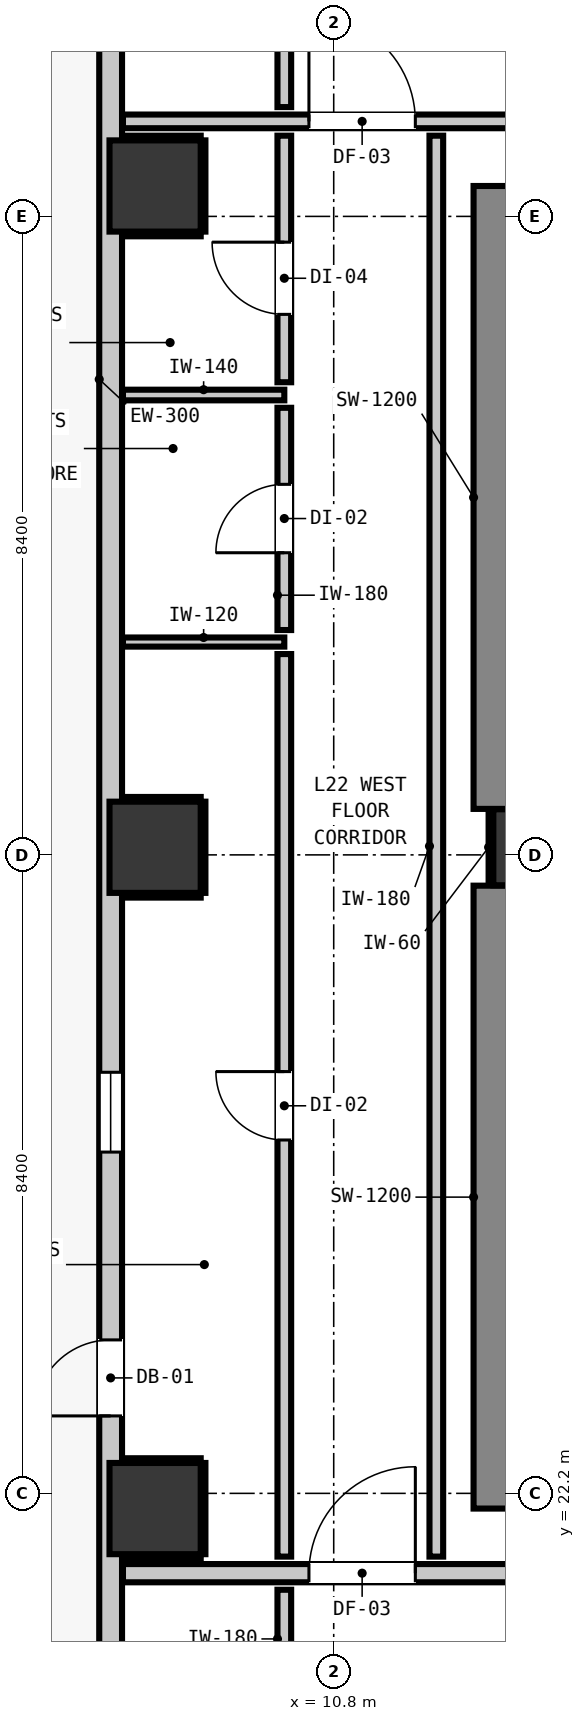
"""IFC4 building model, lengths in metres.
Left out: names, types, materials, properties, quantities, classifications, styles, units other than length and angle.
Written with IfcOpenShell. Run it as: python <this file> out.ifc"""

import sys

from ifc_helpers import new_model, si_unit, direction, frame, frame_2d, origin, origin_2d, place, context, subcontext, project, spatial, rectangle, extrude, element, fill, save


model = new_model("IFC4")
c1 = context("Model", 3, precision=1e-05, world=origin(), true_north=direction((0.0, 1.0)))
c2 = subcontext(c1, "Body", "Model", "MODEL_VIEW")
j1 = project(units=[si_unit("LENGTHUNIT", "METRE"), si_unit("PLANEANGLEUNIT", "RADIAN")], contexts=[c1])
p1 = place(None, origin())
s1 = spatial("IfcSite", under=j1, at=p1, CompositionType="ELEMENT")
p2 = place(p1, origin())
s2 = spatial("IfcBuilding", under=s1, at=p2, CompositionType="ELEMENT")
p3 = place(p2, frame((0.0, 0.0, 78.44)))
s3 = spatial("IfcBuildingStorey", under=s2, at=p3, CompositionType="ELEMENT", Elevation=78.44)
p4 = place(p3, frame((13.4, 30.7, 0.0), z_axis=(0.0, 0.0, 1.0), x_axis=(1.0, 0.0, 0.0)))
e1 = element("IfcColumn", 1, at=p4, inside=s3, PredefinedType="COLUMN", context=c2, shape_type="SweptSolid", body=[
    extrude(rectangle(XDim=1.0, YDim=1.0, at=origin_2d()), origin(), (0.0, 0.0, 1.0), 3.32),
])
p5 = place(p3, frame((13.24, 22.0, 0.0), z_axis=(0.0, 0.0, 1.0), x_axis=(0.0, 1.0, 0.0)))
e2 = element("IfcWall", 2, at=p5, inside=s3, PredefinedType="SHEAR", context=c2, shape_type="SweptSolid", body=[
    extrude(rectangle(XDim=8.195, YDim=1.2, at=frame_2d((4.098, 0.0))), origin(), (0.0, 0.0, 1.0), 3.32),
])
p6 = place(p3, frame((13.24, 31.205, 0.0), z_axis=(0.0, 0.0, 1.0), x_axis=(0.0, 1.0, 0.0)))
e3 = element("IfcWall", 3, at=p6, inside=s3, PredefinedType="SHEAR", context=c2, shape_type="SweptSolid", body=[
    extrude(rectangle(XDim=8.195, YDim=1.2, at=frame_2d((4.097, 0.0))), origin(), (0.0, 0.0, 1.0), 3.32),
])
for number, where, z_axis, x_axis in (
    (4, (8.45, 22.0, 0.0), (0.0, 0.0, 1.0), (1.0, 0.0, 0.0)),
    (5, (8.45, 30.7, 0.0), (0.0, 0.0, 1.0), (1.0, 0.0, 0.0)),
    (6, (8.45, 39.4, 0.0), (0.0, 0.0, 1.0), (1.0, 0.0, 0.0)),
):
    element("IfcColumn", number, at=place(p3, frame(where, z_axis=z_axis, x_axis=x_axis)), inside=s3, PredefinedType="COLUMN", context=c2, shape_type="SweptSolid", body=[
        extrude(rectangle(XDim=1.2, YDim=1.2, at=origin_2d()), origin(), (0.0, 0.0, 1.0), 2.9),
    ])
p7 = place(p3, frame((7.865, 16.365, 0.0), z_axis=(0.0, 0.0, 1.0), x_axis=(0.0, 1.0, 0.0)))
e7 = element("IfcWall", 7, at=p7, inside=s3, PredefinedType="STANDARD", context=c2, shape_type="SweptSolid", body=[
    extrude(rectangle(XDim=34.67, YDim=0.3, at=frame_2d((17.335, 0.0))), origin(), (0.0, 0.0, 1.0), 2.9),
])
p8 = place(p7, frame((6.854, 0.0, 0.0)))
e8 = element("IfcOpeningElement", 8, at=p8, cuts=e7, PredefinedType="OPENING", context=c2, shape_type="SweptSolid", body=[
    extrude(rectangle(XDim=1.0, YDim=2.15, at=frame_2d((0.5, 1.075))), frame((0.0, 0.16, 0.0), z_axis=(0.0, -1.0, 0.0), x_axis=(1.0, 0.0, 0.0)), (0.0, 0.0, 1.0), 0.32),
])
p9 = place(p7, frame((29.608, 0.0, 0.85)))
e9 = element("IfcOpeningElement", 9, at=p9, cuts=e7, PredefinedType="OPENING", context=c2, shape_type="SweptSolid", body=[
    extrude(rectangle(XDim=1.05, YDim=1.65, at=frame_2d((0.525, 0.825))), frame((0.0, 0.16, 0.0), z_axis=(0.0, -1.0, 0.0), x_axis=(1.0, 0.0, 0.0)), (0.0, 0.0, 1.0), 0.32),
])
p10 = place(p7, frame((10.325, 0.0, 0.85)))
e10 = element("IfcOpeningElement", 10, at=p10, cuts=e7, PredefinedType="OPENING", context=c2, shape_type="SweptSolid", body=[
    extrude(rectangle(XDim=1.05, YDim=1.65, at=frame_2d((0.525, 0.825))), frame((0.0, 0.16, 0.0), z_axis=(0.0, -1.0, 0.0), x_axis=(1.0, 0.0, 0.0)), (0.0, 0.0, 1.0), 0.32),
])
p11 = place(p3, frame((8.027, 21.15, 0.0), z_axis=(0.0, 0.0, 1.0), x_axis=(1.0, 0.0, 0.0)))
e11 = element("IfcWall", 11, at=p11, inside=s3, PredefinedType="PARTITIONING", context=c2, shape_type="SweptSolid", body=[
    extrude(rectangle(XDim=42.146, YDim=0.24, at=frame_2d((21.073, 0.0))), origin(), (0.0, 0.0, 1.0), 2.9),
])
p12 = place(p11, frame((10.183, 0.0, 0.0)))
e12 = element("IfcOpeningElement", 12, at=p12, cuts=e11, PredefinedType="OPENING", context=c2, shape_type="SweptSolid", body=[
    extrude(rectangle(XDim=1.1, YDim=2.15, at=frame_2d((0.55, 1.075))), frame((0.0, 0.13, 0.0), z_axis=(0.0, -1.0, 0.0), x_axis=(1.0, 0.0, 0.0)), (0.0, 0.0, 1.0), 0.26),
])
p13 = place(p11, frame((2.447, 0.0, 0.0)))
e13 = element("IfcOpeningElement", 13, at=p13, cuts=e11, PredefinedType="OPENING", context=c2, shape_type="SweptSolid", body=[
    extrude(rectangle(XDim=1.4, YDim=2.15, at=frame_2d((0.7, 1.075))), frame((0.0, 0.13, 0.0), z_axis=(0.0, -1.0, 0.0), x_axis=(1.0, 0.0, 0.0)), (0.0, 0.0, 1.0), 0.26),
])
p14 = place(p11, frame((33.948, 0.0, 0.0)))
e14 = element("IfcOpeningElement", 14, at=p14, cuts=e11, PredefinedType="OPENING", context=c2, shape_type="SweptSolid", body=[
    extrude(rectangle(XDim=1.0, YDim=2.15, at=frame_2d((0.5, 1.075))), frame((0.0, 0.13, 0.0), z_axis=(0.0, -1.0, 0.0), x_axis=(1.0, 0.0, 0.0)), (0.0, 0.0, 1.0), 0.26),
])
p15 = place(p3, frame((8.027, 40.25, 0.0), z_axis=(0.0, 0.0, 1.0), x_axis=(1.0, 0.0, 0.0)))
e15 = element("IfcWall", 15, at=p15, inside=s3, PredefinedType="PARTITIONING", context=c2, shape_type="SweptSolid", body=[
    extrude(rectangle(XDim=42.146, YDim=0.18, at=frame_2d((21.073, 0.0))), origin(), (0.0, 0.0, 1.0), 2.9),
])
p16 = place(p15, frame((9.408, 0.0, 0.0)))
e16 = element("IfcOpeningElement", 16, at=p16, cuts=e15, PredefinedType="OPENING", context=c2, shape_type="SweptSolid", body=[
    extrude(rectangle(XDim=1.4, YDim=2.15, at=frame_2d((0.7, 1.075))), frame((0.0, 0.1, 0.0), z_axis=(0.0, -1.0, 0.0), x_axis=(1.0, 0.0, 0.0)), (0.0, 0.0, 1.0), 0.2),
])
p17 = place(p15, frame((2.447, 0.0, 0.0)))
e17 = element("IfcOpeningElement", 17, at=p17, cuts=e15, PredefinedType="OPENING", context=c2, shape_type="SweptSolid", body=[
    extrude(rectangle(XDim=1.4, YDim=2.15, at=frame_2d((0.7, 1.075))), frame((0.0, 0.1, 0.0), z_axis=(0.0, -1.0, 0.0), x_axis=(1.0, 0.0, 0.0)), (0.0, 0.0, 1.0), 0.2),
])
p18 = place(p15, frame((35.474, 0.0, 0.0)))
e18 = element("IfcOpeningElement", 18, at=p18, cuts=e15, PredefinedType="OPENING", context=c2, shape_type="SweptSolid", body=[
    extrude(rectangle(XDim=0.9, YDim=2.1, at=frame_2d((0.45, 1.05))), frame((0.0, 0.1, 0.0), z_axis=(0.0, -1.0, 0.0), x_axis=(1.0, 0.0, 0.0)), (0.0, 0.0, 1.0), 0.2),
])
p19 = place(p3, frame((8.027, 36.65, 0.0), z_axis=(0.0, 0.0, 1.0), x_axis=(1.0, 0.0, 0.0)))
e19 = element("IfcWall", 19, at=p19, inside=s3, PredefinedType="PARTITIONING", context=c2, shape_type="SweptSolid", body=[
    extrude(rectangle(XDim=2.123, YDim=0.14, at=frame_2d((1.062, 0.0))), origin(), (0.0, 0.0, 1.0), 2.9),
])
p20 = place(p3, frame((8.027, 33.4, 0.0), z_axis=(0.0, 0.0, 1.0), x_axis=(1.0, 0.0, 0.0)))
e20 = element("IfcWall", 20, at=p20, inside=s3, PredefinedType="PARTITIONING", context=c2, shape_type="SweptSolid", body=[
    extrude(rectangle(XDim=2.123, YDim=0.12, at=frame_2d((1.062, 0.0))), origin(), (0.0, 0.0, 1.0), 2.9),
])
p21 = place(p3, frame((10.15, 19.638, 0.0), z_axis=(0.0, 0.0, 1.0), x_axis=(0.0, 1.0, 0.0)))
e21 = element("IfcWall", 21, at=p21, inside=s3, PredefinedType="PARTITIONING", context=c2, shape_type="SweptSolid", body=[
    extrude(rectangle(XDim=1.294, YDim=0.18, at=frame_2d((0.647, 0.0))), origin(), (0.0, 0.0, 1.0), 2.9),
])
p22 = place(p3, frame((10.15, 21.368, 0.0), z_axis=(0.0, 0.0, 1.0), x_axis=(0.0, 1.0, 0.0)))
e22 = element("IfcWall", 22, at=p22, inside=s3, PredefinedType="PARTITIONING", context=c2, shape_type="SweptSolid", body=[
    extrude(rectangle(XDim=11.874, YDim=0.18, at=frame_2d((5.937, 0.0))), origin(), (0.0, 0.0, 1.0), 2.9),
])
p23 = place(p22, frame((5.481, 0.0, 0.0)))
e23 = element("IfcOpeningElement", 23, at=p23, cuts=e22, PredefinedType="OPENING", context=c2, shape_type="SweptSolid", body=[
    extrude(rectangle(XDim=0.9, YDim=2.1, at=frame_2d((0.45, 1.05))), frame((0.0, 0.1, 0.0), z_axis=(0.0, -1.0, 0.0), x_axis=(1.0, 0.0, 0.0)), (0.0, 0.0, 1.0), 0.2),
])
p24 = place(p3, frame((10.15, 33.558, 0.0), z_axis=(0.0, 0.0, 1.0), x_axis=(0.0, 1.0, 0.0)))
e24 = element("IfcWall", 24, at=p24, inside=s3, PredefinedType="PARTITIONING", context=c2, shape_type="SweptSolid", body=[
    extrude(rectangle(XDim=2.924, YDim=0.18, at=frame_2d((1.462, 0.0))), origin(), (0.0, 0.0, 1.0), 2.9),
])
p25 = place(p24, frame((1.017, 0.0, 0.0)))
e25 = element("IfcOpeningElement", 25, at=p25, cuts=e24, PredefinedType="OPENING", context=c2, shape_type="SweptSolid", body=[
    extrude(rectangle(XDim=0.9, YDim=2.1, at=frame_2d((0.45, 1.05))), frame((0.0, 0.1, 0.0), z_axis=(0.0, -1.0, 0.0), x_axis=(1.0, 0.0, 0.0)), (0.0, 0.0, 1.0), 0.2),
])
p26 = place(p3, frame((10.15, 36.818, 0.0), z_axis=(0.0, 0.0, 1.0), x_axis=(0.0, 1.0, 0.0)))
e26 = element("IfcWall", 26, at=p26, inside=s3, PredefinedType="PARTITIONING", context=c2, shape_type="SweptSolid", body=[
    extrude(rectangle(XDim=3.244, YDim=0.18, at=frame_2d((1.622, 0.0))), origin(), (0.0, 0.0, 1.0), 2.9),
])
p27 = place(p26, frame((0.893, 0.0, 0.0)))
e27 = element("IfcOpeningElement", 27, at=p27, cuts=e26, PredefinedType="OPENING", context=c2, shape_type="SweptSolid", body=[
    extrude(rectangle(XDim=0.95, YDim=2.1, at=frame_2d((0.475, 1.05))), frame((0.0, 0.1, 0.0), z_axis=(0.0, -1.0, 0.0), x_axis=(1.0, 0.0, 0.0)), (0.0, 0.0, 1.0), 0.2),
])
p28 = place(p3, frame((10.15, 40.438, 0.0), z_axis=(0.0, 0.0, 1.0), x_axis=(0.0, 1.0, 0.0)))
e28 = element("IfcWall", 28, at=p28, inside=s3, PredefinedType="PARTITIONING", context=c2, shape_type="SweptSolid", body=[
    extrude(rectangle(XDim=1.324, YDim=0.18, at=frame_2d((0.662, 0.0))), origin(), (0.0, 0.0, 1.0), 2.9),
])
p29 = place(p3, frame((12.15, 21.368, 0.0), z_axis=(0.0, 0.0, 1.0), x_axis=(0.0, 1.0, 0.0)))
e29 = element("IfcWall", 29, at=p29, inside=s3, PredefinedType="PARTITIONING", context=c2, shape_type="SweptSolid", body=[
    extrude(rectangle(XDim=18.694, YDim=0.18, at=frame_2d((9.347, 0.0))), origin(), (0.0, 0.0, 1.0), 2.9),
])
p30 = place(p3, frame((12.868, 30.21, 0.0), z_axis=(0.0, 0.0, 1.0), x_axis=(0.0, 1.0, 0.0)))
e30 = element("IfcWall", 30, at=p30, inside=s3, PredefinedType="PARTITIONING", context=c2, shape_type="SweptSolid", body=[
    extrude(rectangle(XDim=0.98, YDim=0.06, at=frame_2d((0.49, 0.0))), origin(), (0.0, 0.0, 1.0), 0.905),
])
for number, where, z_axis, x_axis in (
    (31, (8.03, 21.368, 0.0), (0.0, 0.0, 1.0), (1.0, 0.0, 0.0)),
    (32, (8.03, 22.632, 0.0), (0.0, 0.0, 1.0), (1.0, 0.0, 0.0)),
):
    element("IfcWall", number, at=place(p3, frame(where, z_axis=z_axis, x_axis=x_axis)), inside=s3, PredefinedType="PARTITIONING", context=c2, shape_type="SweptSolid", body=[
        extrude(rectangle(XDim=1.02, YDim=0.06, at=frame_2d((0.51, 0.0))), origin(), (0.0, 0.0, 1.0), 0.905),
    ])
p31 = place(p3, frame((9.082, 21.4, 0.0), z_axis=(0.0, 0.0, 1.0), x_axis=(0.0, 1.0, 0.0)))
e33 = element("IfcWall", 33, at=p31, inside=s3, PredefinedType="PARTITIONING", context=c2, shape_type="SweptSolid", body=[
    extrude(rectangle(XDim=1.2, YDim=0.06, at=frame_2d((0.6, 0.0))), origin(), (0.0, 0.0, 1.0), 1.45),
])
for number, where, z_axis, x_axis in (
    (34, (8.03, 30.068, 0.0), (0.0, 0.0, 1.0), (1.0, 0.0, 0.0)),
    (35, (8.03, 31.332, 0.0), (0.0, 0.0, 1.0), (1.0, 0.0, 0.0)),
):
    element("IfcWall", number, at=place(p3, frame(where, z_axis=z_axis, x_axis=x_axis)), inside=s3, PredefinedType="PARTITIONING", context=c2, shape_type="SweptSolid", body=[
        extrude(rectangle(XDim=1.02, YDim=0.06, at=frame_2d((0.51, 0.0))), origin(), (0.0, 0.0, 1.0), 0.905),
    ])
p32 = place(p3, frame((9.082, 30.1, 0.0), z_axis=(0.0, 0.0, 1.0), x_axis=(0.0, 1.0, 0.0)))
e36 = element("IfcWall", 36, at=p32, inside=s3, PredefinedType="PARTITIONING", context=c2, shape_type="SweptSolid", body=[
    extrude(rectangle(XDim=1.2, YDim=0.06, at=frame_2d((0.6, 0.0))), origin(), (0.0, 0.0, 1.0), 1.45),
])
for number, where, z_axis, x_axis in (
    (37, (8.03, 38.768, 0.0), (0.0, 0.0, 1.0), (1.0, 0.0, 0.0)),
    (38, (8.03, 40.032, 0.0), (0.0, 0.0, 1.0), (1.0, 0.0, 0.0)),
):
    element("IfcWall", number, at=place(p3, frame(where, z_axis=z_axis, x_axis=x_axis)), inside=s3, PredefinedType="PARTITIONING", context=c2, shape_type="SweptSolid", body=[
        extrude(rectangle(XDim=1.02, YDim=0.06, at=frame_2d((0.51, 0.0))), origin(), (0.0, 0.0, 1.0), 0.905),
    ])
p33 = place(p3, frame((9.082, 38.8, 0.0), z_axis=(0.0, 0.0, 1.0), x_axis=(0.0, 1.0, 0.0)))
e39 = element("IfcWall", 39, at=p33, inside=s3, PredefinedType="PARTITIONING", context=c2, shape_type="SweptSolid", body=[
    extrude(rectangle(XDim=1.2, YDim=0.06, at=frame_2d((0.6, 0.0))), origin(), (0.0, 0.0, 1.0), 1.45),
])
p34 = place(p8, origin())
e40 = element("IfcDoor", 40, at=p34, inside=s3, OperationType="SINGLE_SWING_LEFT", PredefinedType="DOOR", context=c2, shape_type="SweptSolid", body=[
    extrude(rectangle(XDim=1.0, YDim=2.15, at=frame_2d((0.5, 1.075))), frame((0.0, 0.025, 0.0), z_axis=(0.0, -1.0, 0.0), x_axis=(1.0, 0.0, 0.0)), (0.0, 0.0, 1.0), 0.05),
])
fill(e8, e40)
p35 = place(p10, origin())
e41 = element("IfcWindow", 41, at=p35, inside=s3, PartitioningType="SINGLE_PANEL", PredefinedType="WINDOW", context=c2, shape_type="SweptSolid", body=[
    extrude(rectangle(XDim=1.05, YDim=1.65, at=frame_2d((0.525, 0.825))), frame((0.0, 0.03, 0.0), z_axis=(0.0, -1.0, 0.0), x_axis=(1.0, 0.0, 0.0)), (0.0, 0.0, 1.0), 0.06),
])
fill(e10, e41)
p36 = place(p13, origin())
e42 = element("IfcDoor", 42, at=p36, inside=s3, OperationType="SINGLE_SWING_RIGHT", PredefinedType="DOOR", context=c2, shape_type="SweptSolid", body=[
    extrude(rectangle(XDim=1.4, YDim=2.15, at=frame_2d((0.7, 1.075))), frame((0.0, 0.025, 0.0), z_axis=(0.0, -1.0, 0.0), x_axis=(1.0, 0.0, 0.0)), (0.0, 0.0, 1.0), 0.05),
])
fill(e13, e42)
p37 = place(p17, origin())
e43 = element("IfcDoor", 43, at=p37, inside=s3, OperationType="SINGLE_SWING_LEFT", PredefinedType="DOOR", context=c2, shape_type="SweptSolid", body=[
    extrude(rectangle(XDim=1.4, YDim=2.15, at=frame_2d((0.7, 1.075))), frame((0.0, 0.025, 0.0), z_axis=(0.0, -1.0, 0.0), x_axis=(1.0, 0.0, 0.0)), (0.0, 0.0, 1.0), 0.05),
])
fill(e17, e43)
p38 = place(p23, origin())
e44 = element("IfcDoor", 44, at=p38, inside=s3, OperationType="SINGLE_SWING_RIGHT", PredefinedType="DOOR", context=c2, shape_type="SweptSolid", body=[
    extrude(rectangle(XDim=0.9, YDim=2.1, at=frame_2d((0.45, 1.05))), frame((0.0, 0.025, 0.0), z_axis=(0.0, -1.0, 0.0), x_axis=(1.0, 0.0, 0.0)), (0.0, 0.0, 1.0), 0.05),
])
fill(e23, e44)
p39 = place(p25, origin())
e45 = element("IfcDoor", 45, at=p39, inside=s3, OperationType="SINGLE_SWING_LEFT", PredefinedType="DOOR", context=c2, shape_type="SweptSolid", body=[
    extrude(rectangle(XDim=0.9, YDim=2.1, at=frame_2d((0.45, 1.05))), frame((0.0, 0.025, 0.0), z_axis=(0.0, -1.0, 0.0), x_axis=(1.0, 0.0, 0.0)), (0.0, 0.0, 1.0), 0.05),
])
fill(e25, e45)
p40 = place(p27, origin())
e46 = element("IfcDoor", 46, at=p40, inside=s3, OperationType="SINGLE_SWING_RIGHT", PredefinedType="DOOR", context=c2, shape_type="SweptSolid", body=[
    extrude(rectangle(XDim=0.95, YDim=2.1, at=frame_2d((0.475, 1.05))), frame((0.0, 0.025, 0.0), z_axis=(0.0, -1.0, 0.0), x_axis=(1.0, 0.0, 0.0)), (0.0, 0.0, 1.0), 0.05),
])
fill(e27, e46)
save(model, sys.argv[1])
